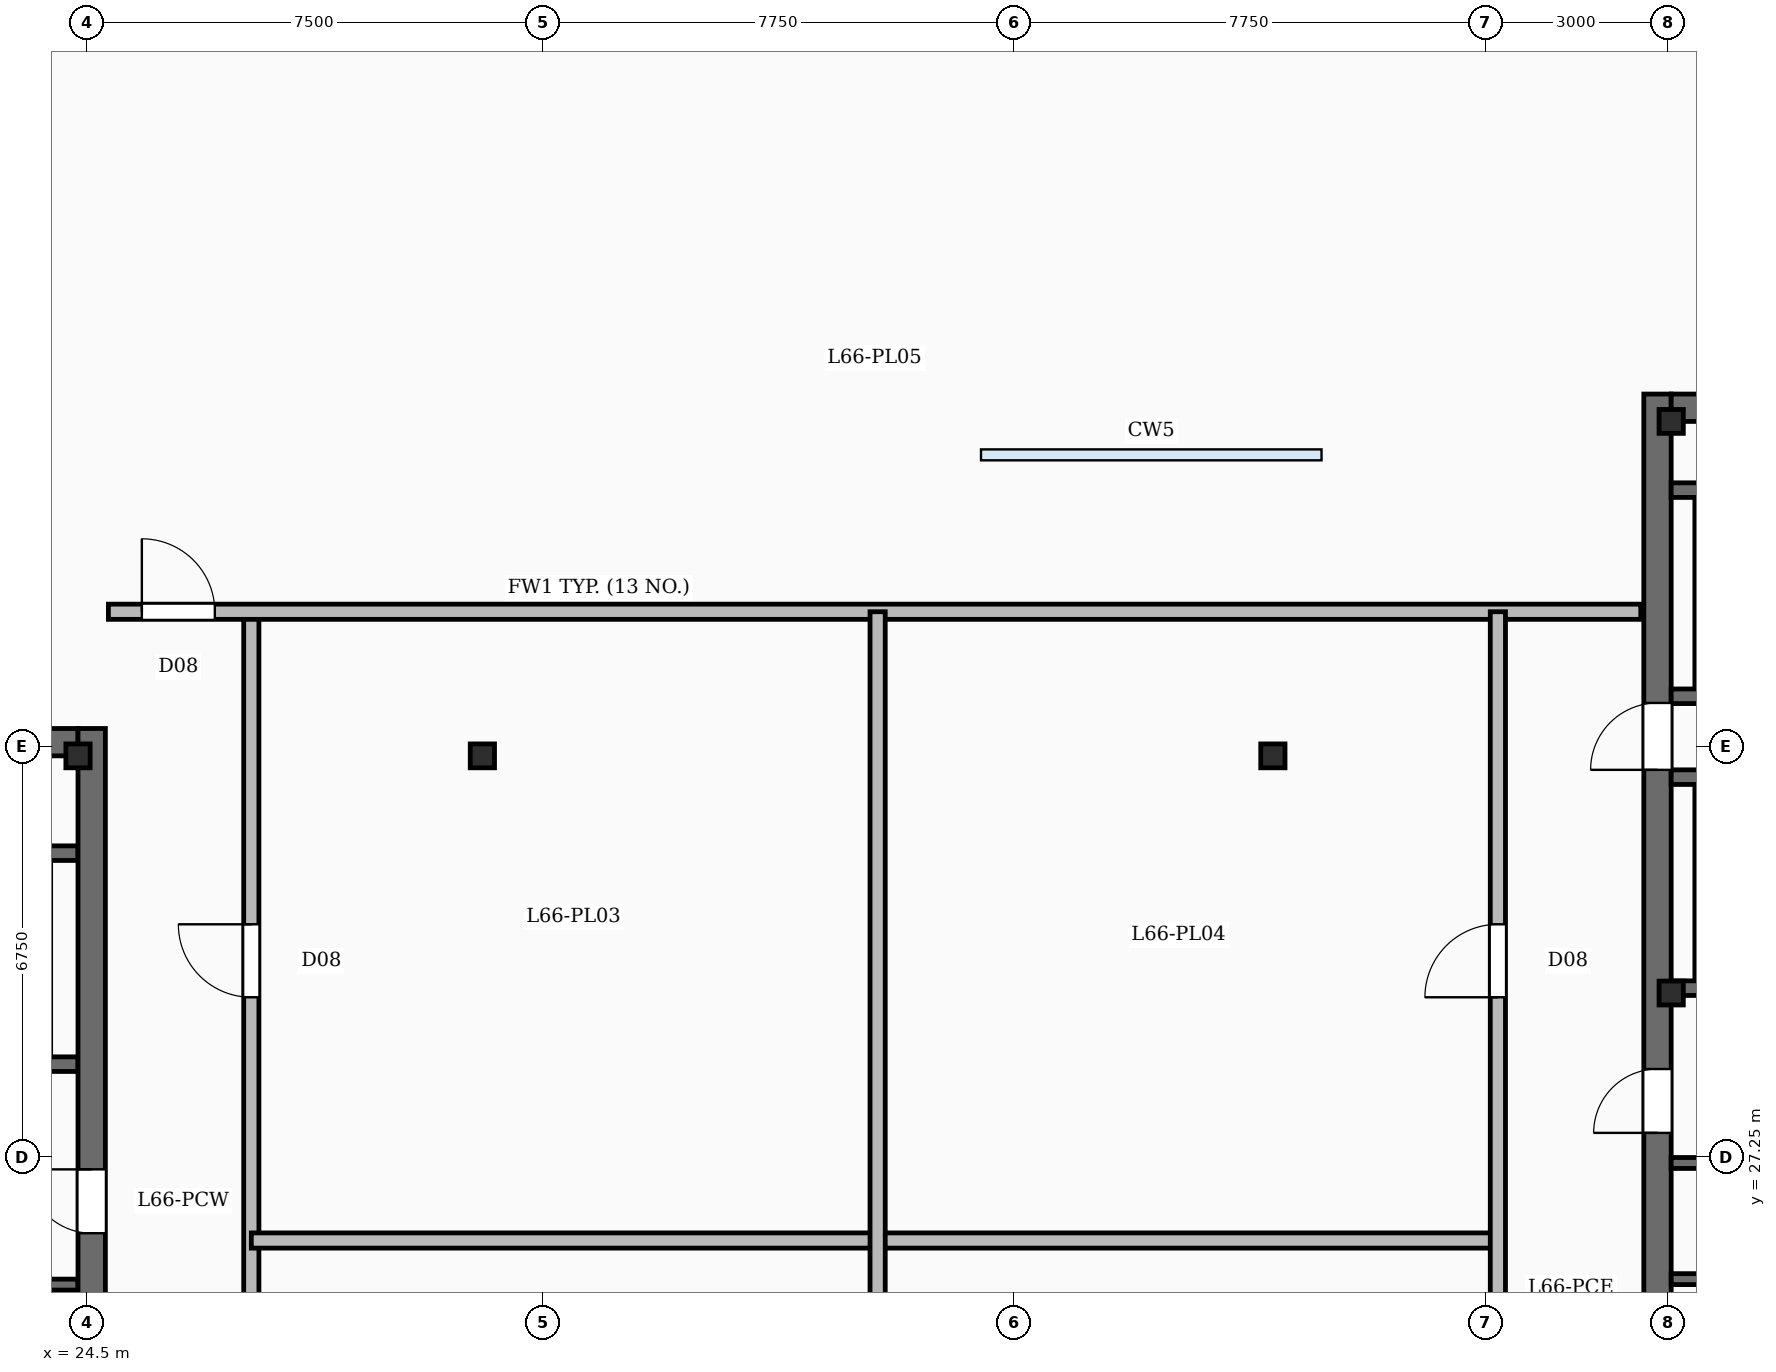
"""IFC4 building model, lengths in metres.
Left out: names, types, materials, properties, quantities, classifications, styles, units other than length and angle.
Written with IfcOpenShell. Run it as: python <this file> out.ifc"""

import sys

from ifc_helpers import new_model, si_unit, direction, frame, frame_2d, origin, origin_2d, place, context, subcontext, project, spatial, rectangle, circle, i_section, extrude, element, fill, save


model = new_model("IFC4")
c1 = context("Model", 3, precision=1e-05, world=origin(), true_north=direction((0.0, 1.0)))
c2 = subcontext(c1, "Body", "Model", "MODEL_VIEW")
j1 = project(units=[si_unit("LENGTHUNIT", "METRE"), si_unit("PLANEANGLEUNIT", "RADIAN")], contexts=[c1])
p1 = place(None, origin())
s1 = spatial("IfcSite", under=j1, at=p1, CompositionType="ELEMENT")
p2 = place(p1, origin())
s2 = spatial("IfcBuilding", under=s1, at=p2, CompositionType="ELEMENT")
p3 = place(p2, frame((0.0, 0.0, 269.7)))
s3 = spatial("IfcBuildingStorey", under=s2, at=p3, CompositionType="ELEMENT", Elevation=269.7)
p4 = place(p3, frame((24.575, 19.0, -0.42), z_axis=(0.0, 0.0, 1.0), x_axis=(0.0, 1.0, 0.0)))
e1 = element("IfcWall", 1, at=p4, inside=s3, PredefinedType="SHEAR", context=c2, shape_type="SweptSolid", body=[
    extrude(rectangle(XDim=15.3, YDim=0.45, at=frame_2d((7.65, 0.0))), origin(), (0.0, 0.0, 1.0), 5.17),
])
p5 = place(p4, frame((2.5, 0.0, 0.42)))
e2 = element("IfcOpeningElement", 2, at=p5, cuts=e1, PredefinedType="OPENING", context=c2, shape_type="SweptSolid", body=[
    extrude(rectangle(XDim=1.05, YDim=2.15, at=frame_2d((0.525, 1.075))), frame((0.0, 0.235, 0.0), z_axis=(0.0, -1.0, 0.0), x_axis=(1.0, 0.0, 0.0)), (0.0, 0.0, 1.0), 0.47),
])
p6 = place(p4, frame((7.0, 0.0, 0.42)))
e3 = element("IfcOpeningElement", 3, at=p6, cuts=e1, PredefinedType="OPENING", context=c2, shape_type="SweptSolid", body=[
    extrude(rectangle(XDim=1.05, YDim=2.15, at=frame_2d((0.525, 1.075))), frame((0.0, 0.235, 0.0), z_axis=(0.0, -1.0, 0.0), x_axis=(1.0, 0.0, 0.0)), (0.0, 0.0, 1.0), 0.47),
])
p7 = place(p3, frame((14.55, 34.075, -0.42), z_axis=(0.0, 0.0, 1.0), x_axis=(1.0, 0.0, 0.0)))
e4 = element("IfcWall", 4, at=p7, inside=s3, PredefinedType="SHEAR", context=c2, shape_type="SweptSolid", body=[
    extrude(rectangle(XDim=9.8, YDim=0.45, at=frame_2d((4.9, 0.0))), origin(), (0.0, 0.0, 1.0), 5.17),
])
p8 = place(p3, frame((50.325, 19.0, -0.42), z_axis=(0.0, 0.0, 1.0), x_axis=(0.0, 1.0, 0.0)))
e5 = element("IfcWall", 5, at=p8, inside=s3, PredefinedType="SHEAR", context=c2, shape_type="SweptSolid", body=[
    extrude(rectangle(XDim=20.8, YDim=0.45, at=frame_2d((10.4, 0.0))), origin(), (0.0, 0.0, 1.0), 5.17),
])
p9 = place(p8, frame((2.5, 0.0, 0.42)))
e6 = element("IfcOpeningElement", 6, at=p9, cuts=e5, PredefinedType="OPENING", context=c2, shape_type="SweptSolid", body=[
    extrude(rectangle(XDim=1.05, YDim=2.15, at=frame_2d((0.525, 1.075))), frame((0.0, 0.235, 0.0), z_axis=(0.0, -1.0, 0.0), x_axis=(1.0, 0.0, 0.0)), (0.0, 0.0, 1.0), 0.47),
])
p10 = place(p8, frame((8.65, 0.0, 0.42)))
e7 = element("IfcOpeningElement", 7, at=p10, cuts=e5, PredefinedType="OPENING", context=c2, shape_type="SweptSolid", body=[
    extrude(rectangle(XDim=1.05, YDim=2.15, at=frame_2d((0.525, 1.075))), frame((0.0, 0.235, 0.0), z_axis=(0.0, -1.0, 0.0), x_axis=(1.0, 0.0, 0.0)), (0.0, 0.0, 1.0), 0.47),
])
p11 = place(p8, frame((14.62, 0.0, 0.42)))
e8 = element("IfcOpeningElement", 8, at=p11, cuts=e5, PredefinedType="OPENING", context=c2, shape_type="SweptSolid", body=[
    extrude(rectangle(XDim=1.1, YDim=2.15, at=frame_2d((0.55, 1.075))), frame((0.0, 0.235, 0.0), z_axis=(0.0, -1.0, 0.0), x_axis=(1.0, 0.0, 0.0)), (0.0, 0.0, 1.0), 0.47),
])
p12 = place(p3, frame((50.55, 39.575, -0.42), z_axis=(0.0, 0.0, 1.0), x_axis=(1.0, 0.0, 0.0)))
e9 = element("IfcWall", 9, at=p12, inside=s3, PredefinedType="SHEAR", context=c2, shape_type="SweptSolid", body=[
    extrude(rectangle(XDim=9.8, YDim=0.45, at=frame_2d((4.9, 0.0))), origin(), (0.0, 0.0, 1.0), 5.17),
])
for number, where, z_axis, x_axis in (
    (10, (24.35, 33.85, -0.42), (0.0, 0.0, 1.0), (1.0, 0.0, 0.0)),
    (11, (50.55, 29.95, -0.42), (0.0, 0.0, 1.0), (1.0, 0.0, 0.0)),
    (12, (50.55, 39.35, -0.42), (0.0, 0.0, 1.0), (1.0, 0.0, 0.0)),
    (13, (31.0, 33.85, -0.42), (0.0, 0.0, 1.0), (1.0, 0.0, 0.0)),
    (14, (44.0, 33.85, -0.42), (0.0, 0.0, 1.0), (1.0, 0.0, 0.0)),
):
    element("IfcColumn", number, at=place(p3, frame(where, z_axis=z_axis, x_axis=x_axis)), inside=s3, PredefinedType="COLUMN", context=c2, shape_type="SweptSolid", body=[
        extrude(i_section(OverallWidth=0.399, OverallDepth=0.393, WebThickness=0.023, FlangeThickness=0.037, FilletRadius=0.02, at=origin_2d()), origin(), (0.0, 0.0, 1.0), 5.17),
    ])
p13 = place(p3, frame((54.542, 45.154, 0.067), z_axis=(-0.716219397868, 0.576159733753, 0.393788947685), x_axis=(-0.626805025909, -0.779176141508, 0.0)))
e15 = element("IfcColumn", 15, at=p13, inside=s3, PredefinedType="COLUMN", context=c2, shape_type="SweptSolid", body=[
    extrude(circle(Radius=0.48, at=origin_2d()), origin(), (0.0, 0.0, 1.0), 10.657),
])
p14 = place(p3, frame((19.891, 49.545, 0.0), z_axis=(0.0, 0.0, 1.0), x_axis=(0.993571439016, -0.113206870688, 0.0)))
e16 = element("IfcWall", 16, at=p14, inside=s3, PredefinedType="SOLIDWALL", context=c2, shape_type="SweptSolid", body=[
    extrude(rectangle(XDim=46.8, YDim=0.42, at=frame_2d((23.4, 0.0))), origin(), (0.0, 0.0, 1.0), 4.75),
])
p15 = place(p3, frame((24.35, 28.78, 0.0), z_axis=(0.0, 0.0, 1.0), x_axis=(-1.0, 0.0, 0.0)))
e17 = element("IfcWall", 17, at=p15, inside=s3, PredefinedType="SOLIDWALL", context=c2, shape_type="SweptSolid", body=[
    extrude(rectangle(XDim=9.8, YDim=0.24, at=frame_2d((4.9, 0.0))), origin(), (0.0, 0.0, 1.0), 4.75),
])
p16 = place(p15, frame((7.83, 0.0, 0.0)))
e18 = element("IfcOpeningElement", 18, at=p16, cuts=e17, PredefinedType="OPENING", context=c2, shape_type="SweptSolid", body=[
    extrude(rectangle(XDim=1.1, YDim=2.15, at=frame_2d((0.55, 1.075))), frame((0.0, 0.13, 0.0), z_axis=(0.0, -1.0, 0.0), x_axis=(1.0, 0.0, 0.0)), (0.0, 0.0, 1.0), 0.26),
])
p17 = place(p3, frame((14.55, 32.25, 0.0), z_axis=(0.0, 0.0, 1.0), x_axis=(1.0, 0.0, 0.0)))
e19 = element("IfcWall", 19, at=p17, inside=s3, PredefinedType="SOLIDWALL", context=c2, shape_type="SweptSolid", body=[
    extrude(rectangle(XDim=9.8, YDim=0.24, at=frame_2d((4.9, 0.0))), origin(), (0.0, 0.0, 1.0), 4.75),
])
p18 = place(p3, frame((60.35, 30.03, 0.0), z_axis=(0.0, 0.0, 1.0), x_axis=(-1.0, 0.0, 0.0)))
e20 = element("IfcWall", 20, at=p18, inside=s3, PredefinedType="SOLIDWALL", context=c2, shape_type="SweptSolid", body=[
    extrude(rectangle(XDim=9.8, YDim=0.24, at=frame_2d((4.9, 0.0))), origin(), (0.0, 0.0, 1.0), 4.75),
])
p19 = place(p18, frame((7.83, 0.0, 0.0)))
e21 = element("IfcOpeningElement", 21, at=p19, cuts=e20, PredefinedType="OPENING", context=c2, shape_type="SweptSolid", body=[
    extrude(rectangle(XDim=1.1, YDim=2.15, at=frame_2d((0.55, 1.075))), frame((0.0, 0.13, 0.0), z_axis=(0.0, -1.0, 0.0), x_axis=(1.0, 0.0, 0.0)), (0.0, 0.0, 1.0), 0.26),
])
p20 = place(p3, frame((50.55, 33.5, 0.0), z_axis=(0.0, 0.0, 1.0), x_axis=(1.0, 0.0, 0.0)))
e22 = element("IfcWall", 22, at=p20, inside=s3, PredefinedType="SOLIDWALL", context=c2, shape_type="SweptSolid", body=[
    extrude(rectangle(XDim=9.8, YDim=0.24, at=frame_2d((4.9, 0.0))), origin(), (0.0, 0.0, 1.0), 4.75),
])
p21 = place(p3, frame((51.06, 30.15, 0.0), z_axis=(0.0, 0.0, 1.0), x_axis=(0.0, 1.0, 0.0)))
e23 = element("IfcWall", 23, at=p21, inside=s3, PredefinedType="SOLIDWALL", context=c2, shape_type="SweptSolid", body=[
    extrude(rectangle(XDim=3.23, YDim=0.24, at=frame_2d((1.615, 0.0))), origin(), (0.0, 0.0, 1.0), 4.75),
])
p22 = place(p3, frame((60.35, 34.83, 0.0), z_axis=(0.0, 0.0, 1.0), x_axis=(-1.0, 0.0, 0.0)))
e24 = element("IfcWall", 24, at=p22, inside=s3, PredefinedType="SOLIDWALL", context=c2, shape_type="SweptSolid", body=[
    extrude(rectangle(XDim=9.8, YDim=0.24, at=frame_2d((4.9, 0.0))), origin(), (0.0, 0.0, 1.0), 4.75),
])
p23 = place(p22, frame((7.87, 0.0, 0.0)))
e25 = element("IfcOpeningElement", 25, at=p23, cuts=e24, PredefinedType="OPENING", context=c2, shape_type="SweptSolid", body=[
    extrude(rectangle(XDim=1.1, YDim=2.15, at=frame_2d((0.55, 1.075))), frame((0.0, 0.13, 0.0), z_axis=(0.0, -1.0, 0.0), x_axis=(1.0, 0.0, 0.0)), (0.0, 0.0, 1.0), 0.26),
])
p24 = place(p3, frame((50.55, 38.22, 0.0), z_axis=(0.0, 0.0, 1.0), x_axis=(1.0, 0.0, 0.0)))
e26 = element("IfcWall", 26, at=p24, inside=s3, PredefinedType="SOLIDWALL", context=c2, shape_type="SweptSolid", body=[
    extrude(rectangle(XDim=9.8, YDim=0.24, at=frame_2d((4.9, 0.0))), origin(), (0.0, 0.0, 1.0), 4.75),
])
p25 = place(p3, frame((51.06, 34.95, 0.0), z_axis=(0.0, 0.0, 1.0), x_axis=(0.0, 1.0, 0.0)))
e27 = element("IfcWall", 27, at=p25, inside=s3, PredefinedType="SOLIDWALL", context=c2, shape_type="SweptSolid", body=[
    extrude(rectangle(XDim=3.15, YDim=0.24, at=frame_2d((1.575, 0.0))), origin(), (0.0, 0.0, 1.0), 4.75),
])
p26 = place(p3, frame((50.55, 27.155, 0.0), z_axis=(0.0, 0.0, 1.0), x_axis=(1.0, 0.0, 0.0)))
e28 = element("IfcWall", 28, at=p26, inside=s3, PredefinedType="SOLIDWALL", context=c2, shape_type="SweptSolid", body=[
    extrude(rectangle(XDim=3.315, YDim=0.18, at=frame_2d((1.657, 0.0))), origin(), (0.0, 0.0, 1.0), 4.75),
])
p27 = place(p26, frame((1.235, 0.0, 0.0)))
e29 = element("IfcOpeningElement", 29, at=p27, cuts=e28, PredefinedType="OPENING", context=c2, shape_type="SweptSolid", body=[
    extrude(rectangle(XDim=1.35, YDim=2.3, at=frame_2d((0.675, 1.15))), frame((0.0, 0.1, 0.0), z_axis=(0.0, -1.0, 0.0), x_axis=(1.0, 0.0, 0.0)), (0.0, 0.0, 1.0), 0.2),
])
p28 = place(p3, frame((50.55, 25.245, 0.0), z_axis=(0.0, 0.0, 1.0), x_axis=(1.0, 0.0, 0.0)))
e30 = element("IfcWall", 30, at=p28, inside=s3, PredefinedType="SOLIDWALL", context=c2, shape_type="SweptSolid", body=[
    extrude(rectangle(XDim=3.315, YDim=0.18, at=frame_2d((1.657, 0.0))), origin(), (0.0, 0.0, 1.0), 4.75),
])
p29 = place(p3, frame((20.95, 25.155, 0.0), z_axis=(0.0, 0.0, 1.0), x_axis=(1.0, 0.0, 0.0)))
e31 = element("IfcWall", 31, at=p29, inside=s3, PredefinedType="SOLIDWALL", context=c2, shape_type="SweptSolid", body=[
    extrude(rectangle(XDim=3.4, YDim=0.18, at=frame_2d((1.7, 0.0))), origin(), (0.0, 0.0, 1.0), 4.75),
])
p30 = place(p3, frame((37.5, 15.38, 0.0), z_axis=(0.0, 0.0, 1.0), x_axis=(0.0, 1.0, 0.0)))
e32 = element("IfcWall", 32, at=p30, inside=s3, PredefinedType="SOLIDWALL", context=c2, shape_type="SweptSolid", body=[
    extrude(rectangle(XDim=20.84, YDim=0.25, at=frame_2d((10.42, 0.0))), origin(), (0.0, 0.0, 1.0), 3.81),
])
p31 = place(p3, frame((27.2, 25.88, 0.0), z_axis=(0.0, 0.0, 1.0), x_axis=(1.0, 0.0, 0.0)))
e33 = element("IfcWall", 33, at=p31, inside=s3, PredefinedType="SOLIDWALL", context=c2, shape_type="SweptSolid", body=[
    extrude(rectangle(XDim=20.5, YDim=0.25, at=frame_2d((10.25, 0.0))), origin(), (0.0, 0.0, 1.0), 3.81),
])
p32 = place(p3, frame((24.85, 36.22, 0.0), z_axis=(0.0, 0.0, 1.0), x_axis=(1.0, 0.0, 0.0)))
e34 = element("IfcWall", 34, at=p32, inside=s3, PredefinedType="SOLIDWALL", context=c2, shape_type="SweptSolid", body=[
    extrude(rectangle(XDim=25.2, YDim=0.25, at=frame_2d((12.6, 0.0))), origin(), (0.0, 0.0, 1.0), 3.81),
])
p33 = place(p32, frame((0.55, 0.0, 0.0)))
e35 = element("IfcOpeningElement", 35, at=p33, cuts=e34, PredefinedType="OPENING", context=c2, shape_type="SweptSolid", body=[
    extrude(rectangle(XDim=1.2, YDim=2.2, at=frame_2d((0.6, 1.1))), frame((0.0, 0.135, 0.0), z_axis=(0.0, -1.0, 0.0), x_axis=(1.0, 0.0, 0.0)), (0.0, 0.0, 1.0), 0.27),
])
p34 = place(p3, frame((27.2, 15.38, 0.0), z_axis=(0.0, 0.0, 1.0), x_axis=(0.0, 1.0, 0.0)))
e36 = element("IfcWall", 36, at=p34, inside=s3, PredefinedType="SOLIDWALL", context=c2, shape_type="SweptSolid", body=[
    extrude(rectangle(XDim=20.84, YDim=0.25, at=frame_2d((10.42, 0.0))), origin(), (0.0, 0.0, 1.0), 3.81),
])
p35 = place(p34, frame((4.8, 0.0, 0.0)))
e37 = element("IfcOpeningElement", 37, at=p35, cuts=e36, PredefinedType="OPENING", context=c2, shape_type="SweptSolid", body=[
    extrude(rectangle(XDim=1.2, YDim=2.2, at=frame_2d((0.6, 1.1))), frame((0.0, 0.135, 0.0), z_axis=(0.0, -1.0, 0.0), x_axis=(1.0, 0.0, 0.0)), (0.0, 0.0, 1.0), 0.27),
])
p36 = place(p34, frame((14.5, 0.0, 0.0)))
e38 = element("IfcOpeningElement", 38, at=p36, cuts=e36, PredefinedType="OPENING", context=c2, shape_type="SweptSolid", body=[
    extrude(rectangle(XDim=1.2, YDim=2.2, at=frame_2d((0.6, 1.1))), frame((0.0, 0.135, 0.0), z_axis=(0.0, -1.0, 0.0), x_axis=(1.0, 0.0, 0.0)), (0.0, 0.0, 1.0), 0.27),
])
p37 = place(p3, frame((47.7, 15.38, 0.0), z_axis=(0.0, 0.0, 1.0), x_axis=(0.0, 1.0, 0.0)))
e39 = element("IfcWall", 39, at=p37, inside=s3, PredefinedType="SOLIDWALL", context=c2, shape_type="SweptSolid", body=[
    extrude(rectangle(XDim=20.84, YDim=0.25, at=frame_2d((10.42, 0.0))), origin(), (0.0, 0.0, 1.0), 3.81),
])
p38 = place(p37, frame((4.8, 0.0, 0.0)))
e40 = element("IfcOpeningElement", 40, at=p38, cuts=e39, PredefinedType="OPENING", context=c2, shape_type="SweptSolid", body=[
    extrude(rectangle(XDim=1.2, YDim=2.2, at=frame_2d((0.6, 1.1))), frame((0.0, 0.135, 0.0), z_axis=(0.0, -1.0, 0.0), x_axis=(1.0, 0.0, 0.0)), (0.0, 0.0, 1.0), 0.27),
])
p39 = place(p37, frame((14.5, 0.0, 0.0)))
e41 = element("IfcOpeningElement", 41, at=p39, cuts=e39, PredefinedType="OPENING", context=c2, shape_type="SweptSolid", body=[
    extrude(rectangle(XDim=1.2, YDim=2.2, at=frame_2d((0.6, 1.1))), frame((0.0, 0.135, 0.0), z_axis=(0.0, -1.0, 0.0), x_axis=(1.0, 0.0, 0.0)), (0.0, 0.0, 1.0), 0.27),
])
p40 = place(p6, origin())
e42 = element("IfcDoor", 42, at=p40, inside=s3, OperationType="SINGLE_SWING_RIGHT", PredefinedType="DOOR", context=c2, shape_type="SweptSolid", body=[
    extrude(rectangle(XDim=1.05, YDim=2.15, at=frame_2d((0.525, 1.075))), frame((0.0, 0.025, 0.0), z_axis=(0.0, -1.0, 0.0), x_axis=(1.0, 0.0, 0.0)), (0.0, 0.0, 1.0), 0.05),
])
fill(e3, e42)
p41 = place(p10, origin())
e43 = element("IfcDoor", 43, at=p41, inside=s3, OperationType="SINGLE_SWING_LEFT", PredefinedType="DOOR", context=c2, shape_type="SweptSolid", body=[
    extrude(rectangle(XDim=1.05, YDim=2.15, at=frame_2d((0.525, 1.075))), frame((0.0, 0.025, 0.0), z_axis=(0.0, -1.0, 0.0), x_axis=(1.0, 0.0, 0.0)), (0.0, 0.0, 1.0), 0.05),
])
fill(e7, e43)
p42 = place(p11, origin())
e44 = element("IfcDoor", 44, at=p42, inside=s3, OperationType="SINGLE_SWING_LEFT", PredefinedType="DOOR", context=c2, shape_type="SweptSolid", body=[
    extrude(rectangle(XDim=1.1, YDim=2.15, at=frame_2d((0.55, 1.075))), frame((0.0, 0.025, 0.0), z_axis=(0.0, -1.0, 0.0), x_axis=(1.0, 0.0, 0.0)), (0.0, 0.0, 1.0), 0.05),
])
fill(e8, e44)
p43 = place(p33, origin())
e45 = element("IfcDoor", 45, at=p43, inside=s3, OperationType="SINGLE_SWING_LEFT", PredefinedType="DOOR", context=c2, shape_type="SweptSolid", body=[
    extrude(rectangle(XDim=1.2, YDim=2.2, at=frame_2d((0.6, 1.1))), frame((0.0, 0.025, 0.0), z_axis=(0.0, -1.0, 0.0), x_axis=(1.0, 0.0, 0.0)), (0.0, 0.0, 1.0), 0.05),
])
fill(e35, e45)
p44 = place(p36, origin())
e46 = element("IfcDoor", 46, at=p44, inside=s3, OperationType="SINGLE_SWING_RIGHT", PredefinedType="DOOR", context=c2, shape_type="SweptSolid", body=[
    extrude(rectangle(XDim=1.2, YDim=2.2, at=frame_2d((0.6, 1.1))), frame((0.0, 0.025, 0.0), z_axis=(0.0, -1.0, 0.0), x_axis=(1.0, 0.0, 0.0)), (0.0, 0.0, 1.0), 0.05),
])
fill(e38, e46)
p45 = place(p39, origin())
e47 = element("IfcDoor", 47, at=p45, inside=s3, OperationType="SINGLE_SWING_LEFT", PredefinedType="DOOR", context=c2, shape_type="SweptSolid", body=[
    extrude(rectangle(XDim=1.2, YDim=2.2, at=frame_2d((0.6, 1.1))), frame((0.0, 0.025, 0.0), z_axis=(0.0, -1.0, 0.0), x_axis=(1.0, 0.0, 0.0)), (0.0, 0.0, 1.0), 0.05),
])
fill(e41, e47)
save(model, sys.argv[1])
